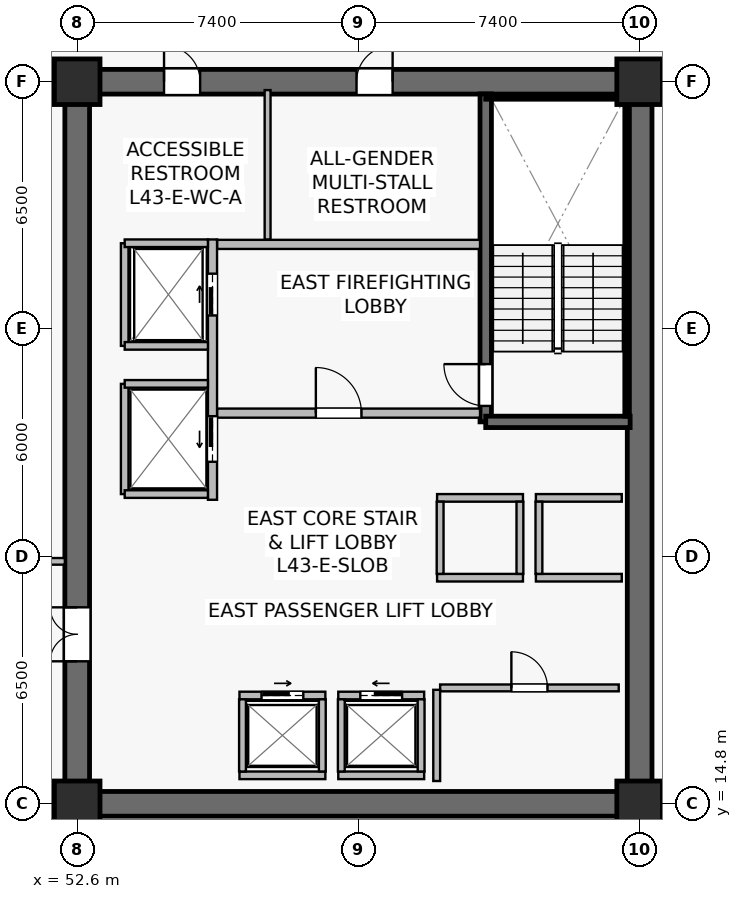
"""IFC4 building model, lengths in metres.
Left out: names, types, materials, properties, quantities, classifications, styles, units other than length and angle.
Written with IfcOpenShell. Run it as: python <this file> out.ifc"""

import sys

from ifc_helpers import new_model, si_unit, direction, frame, frame_2d, origin, origin_2d, place, context, subcontext, project, spatial, rectangle, extrude, source, transform, mapped, element, fill, save


model = new_model("IFC4")
c1 = context("Model", 3, precision=1e-05, world=origin(), true_north=direction((0.0, 1.0)))
c2 = subcontext(c1, "Body", "Model", "MODEL_VIEW")
j1 = project(units=[si_unit("LENGTHUNIT", "METRE"), si_unit("PLANEANGLEUNIT", "RADIAN")], contexts=[c1])
p1 = place(None, origin())
s1 = spatial("IfcSite", under=j1, at=p1, CompositionType="ELEMENT")
p2 = place(p1, origin())
s2 = spatial("IfcBuilding", under=s1, at=p2, CompositionType="ELEMENT")
p3 = place(p2, frame((0.0, 0.0, 178.9)))
s3 = spatial("IfcBuildingStorey", under=s2, at=p3, CompositionType="ELEMENT", Elevation=178.9)
p4 = place(p3, frame((52.275, 14.8, 0.0), z_axis=(0.0, 0.0, 1.0), x_axis=(1.0, 0.0, 0.0)))
e1 = element("IfcWall", 1, at=p4, inside=s3, PredefinedType="SHEAR", context=c2, shape_type="SweptSolid", body=[
    extrude(rectangle(XDim=15.45, YDim=0.65, at=frame_2d((7.725, 0.0))), origin(), (0.0, 0.0, 1.0), 3.79),
])
p5 = place(p3, frame((52.275, 33.8, 0.0), z_axis=(0.0, 0.0, 1.0), x_axis=(1.0, 0.0, 0.0)))
e2 = element("IfcWall", 2, at=p5, inside=s3, PredefinedType="SHEAR", context=c2, shape_type="SweptSolid", body=[
    extrude(rectangle(XDim=15.45, YDim=0.65, at=frame_2d((7.725, 0.0))), origin(), (0.0, 0.0, 1.0), 3.79),
])
p6 = place(p5, frame((7.675, 0.0, 0.0)))
e3 = element("IfcOpeningElement", 3, at=p6, cuts=e2, PredefinedType="OPENING", context=c2, shape_type="SweptSolid", body=[
    extrude(rectangle(XDim=0.95, YDim=2.15, at=frame_2d((0.475, 1.075))), frame((0.0, 0.335, 0.0), z_axis=(0.0, -1.0, 0.0), x_axis=(1.0, 0.0, 0.0)), (0.0, 0.0, 1.0), 0.67),
])
p7 = place(p5, frame((2.61, 0.0, 0.0)))
e4 = element("IfcOpeningElement", 4, at=p7, cuts=e2, PredefinedType="OPENING", context=c2, shape_type="SweptSolid", body=[
    extrude(rectangle(XDim=0.95, YDim=2.15, at=frame_2d((0.475, 1.075))), frame((0.0, 0.335, 0.0), z_axis=(0.0, -1.0, 0.0), x_axis=(1.0, 0.0, 0.0)), (0.0, 0.0, 1.0), 0.67),
])
p8 = place(p3, frame((52.6, 15.125, 0.0), z_axis=(0.0, 0.0, 1.0), x_axis=(0.0, 1.0, 0.0)))
e5 = element("IfcWall", 5, at=p8, inside=s3, PredefinedType="SHEAR", context=c2, shape_type="SweptSolid", body=[
    extrude(rectangle(XDim=18.35, YDim=0.65, at=frame_2d((9.175, 0.0))), origin(), (0.0, 0.0, 1.0), 3.79),
])
p9 = place(p8, frame((3.425, 0.0, 0.0)))
e6 = element("IfcOpeningElement", 6, at=p9, cuts=e5, PredefinedType="OPENING", context=c2, shape_type="SweptSolid", body=[
    extrude(rectangle(XDim=1.42, YDim=2.2, at=frame_2d((0.71, 1.1))), frame((0.0, 0.335, 0.0), z_axis=(0.0, -1.0, 0.0), x_axis=(1.0, 0.0, 0.0)), (0.0, 0.0, 1.0), 0.67),
])
p10 = place(p3, frame((67.4, 15.125, 0.0), z_axis=(0.0, 0.0, 1.0), x_axis=(0.0, 1.0, 0.0)))
e7 = element("IfcWall", 7, at=p10, inside=s3, PredefinedType="SHEAR", context=c2, shape_type="SweptSolid", body=[
    extrude(rectangle(XDim=18.35, YDim=0.65, at=frame_2d((9.175, 0.0))), origin(), (0.0, 0.0, 1.0), 3.79),
])
p11 = place(p3, frame((63.35, 24.85, 0.0), z_axis=(0.0, 0.0, 1.0), x_axis=(0.0, 1.0, 0.0)))
e8 = element("IfcWall", 8, at=p11, inside=s3, PredefinedType="SHEAR", context=c2, shape_type="SweptSolid", body=[
    extrude(rectangle(XDim=8.63, YDim=0.3, at=frame_2d((4.315, 0.0))), origin(), (0.0, 0.0, 1.0), 3.79),
])
p12 = place(p11, frame((0.42, 0.0, 0.0)))
e9 = element("IfcOpeningElement", 9, at=p12, cuts=e8, PredefinedType="OPENING", context=c2, shape_type="SweptSolid", body=[
    extrude(rectangle(XDim=1.1, YDim=2.15, at=frame_2d((0.55, 1.075))), frame((0.0, 0.16, 0.0), z_axis=(0.0, -1.0, 0.0), x_axis=(1.0, 0.0, 0.0)), (0.0, 0.0, 1.0), 0.32),
])
p13 = place(p3, frame((63.35, 24.85, 0.0), z_axis=(0.0, 0.0, 1.0), x_axis=(1.0, 0.0, 0.0)))
e10 = element("IfcWall", 10, at=p13, inside=s3, PredefinedType="SHEAR", context=c2, shape_type="SweptSolid", body=[
    extrude(rectangle(XDim=3.8, YDim=0.3, at=frame_2d((1.9, 0.0))), origin(), (0.0, 0.0, 1.0), 3.79),
])
p14 = place(p3, frame((63.35, 33.4, 0.0), z_axis=(0.0, 0.0, 1.0), x_axis=(1.0, 0.0, 0.0)))
e11 = element("IfcWall", 11, at=p14, inside=s3, PredefinedType="SOLIDWALL", context=c2, shape_type="SweptSolid", body=[
    extrude(rectangle(XDim=3.72, YDim=0.12, at=frame_2d((1.86, 0.0))), origin(), (0.0, 0.0, 1.0), 3.79),
])
p15 = place(p3, frame((67.07, 25.0, 0.0), z_axis=(0.0, 0.0, 1.0), x_axis=(0.0, 1.0, 0.0)))
e12 = element("IfcWall", 12, at=p15, inside=s3, PredefinedType="SOLIDWALL", context=c2, shape_type="SweptSolid", body=[
    extrude(rectangle(XDim=8.32, YDim=0.12, at=frame_2d((4.16, 0.0))), origin(), (0.0, 0.0, 1.0), 3.79),
])
m1 = source(origin(), c2, "Body", "SweptSolid", [
    extrude(rectangle(XDim=1.2, YDim=1.2, at=origin_2d()), origin(), (0.0, 0.0, 1.0), 4.1),
])
for number, where, z_axis, x_axis in (
    (13, (52.6, 14.8, 0.0), (0.0, 0.0, 1.0), (1.0, 0.0, 0.0)),
    (14, (67.4, 14.8, 0.0), (0.0, 0.0, 1.0), (1.0, 0.0, 0.0)),
    (15, (52.6, 33.8, 0.0), (0.0, 0.0, 1.0), (1.0, 0.0, 0.0)),
    (16, (67.4, 33.8, 0.0), (0.0, 0.0, 1.0), (1.0, 0.0, 0.0)),
):
    element("IfcColumn", number, at=place(p3, frame(where, z_axis=z_axis, x_axis=x_axis)), inside=s3, PredefinedType="COLUMN", context=c2, shape_type="MappedRepresentation", body=[
        mapped(m1, transform((0.0, 0.0, 0.0), scale=1.0)),
    ])
p16 = place(p3, frame((56.28, 25.08, 0.0), z_axis=(0.0, 0.0, 1.0), x_axis=(1.0, 0.0, 0.0)))
e17 = element("IfcWall", 17, at=p16, inside=s3, PredefinedType="SOLIDWALL", context=c2, shape_type="SweptSolid", body=[
    extrude(rectangle(XDim=6.92, YDim=0.24, at=frame_2d((3.46, 0.0))), origin(), (0.0, 0.0, 1.0), 3.187),
])
p17 = place(p16, frame((2.6, 0.0, 0.0)))
e18 = element("IfcOpeningElement", 18, at=p17, cuts=e17, PredefinedType="OPENING", context=c2, shape_type="SweptSolid", body=[
    extrude(rectangle(XDim=1.2, YDim=2.16, at=frame_2d((0.6, 1.08))), frame((0.0, 0.13, 0.0), z_axis=(0.0, -1.0, 0.0), x_axis=(1.0, 0.0, 0.0)), (0.0, 0.0, 1.0), 0.26),
])
p18 = place(p3, frame((56.28, 29.52, 0.0), z_axis=(0.0, 0.0, 1.0), x_axis=(1.0, 0.0, 0.0)))
e19 = element("IfcWall", 19, at=p18, inside=s3, PredefinedType="SOLIDWALL", context=c2, shape_type="SweptSolid", body=[
    extrude(rectangle(XDim=6.92, YDim=0.24, at=frame_2d((3.46, 0.0))), origin(), (0.0, 0.0, 1.0), 3.187),
])
p19 = place(p3, frame((56.16, 22.8, 0.0), z_axis=(0.0, 0.0, 1.0), x_axis=(0.0, 1.0, 0.0)))
e20 = element("IfcWall", 20, at=p19, inside=s3, PredefinedType="SOLIDWALL", context=c2, shape_type="SweptSolid", body=[
    extrude(rectangle(XDim=6.85, YDim=0.24, at=frame_2d((3.425, 0.0))), origin(), (0.0, 0.0, 1.0), 2.925),
])
p20 = place(p19, frame((4.85, 0.0, 0.0)))
e21 = element("IfcOpeningElement", 21, at=p20, cuts=e20, PredefinedType="OPENING", context=c2, shape_type="SweptSolid", body=[
    extrude(rectangle(XDim=1.1, YDim=2.22, at=frame_2d((0.55, 1.11))), frame((0.0, 0.13, 0.0), z_axis=(0.0, -1.0, 0.0), x_axis=(1.0, 0.0, 0.0)), (0.0, 0.0, 1.0), 0.26),
])
p21 = place(p19, frame((1.0, 0.0, 0.0)))
e22 = element("IfcOpeningElement", 22, at=p21, cuts=e20, PredefinedType="OPENING", context=c2, shape_type="SweptSolid", body=[
    extrude(rectangle(XDim=1.2, YDim=2.22, at=frame_2d((0.6, 1.11))), frame((0.0, 0.13, 0.0), z_axis=(0.0, -1.0, 0.0), x_axis=(1.0, 0.0, 0.0)), (0.0, 0.0, 1.0), 0.26),
])
p22 = place(p3, frame((59.47, 17.65, 0.0), z_axis=(0.0, 0.0, 1.0), x_axis=(1.0, 0.0, 0.0)))
e23 = element("IfcWall", 23, at=p22, inside=s3, PredefinedType="SOLIDWALL", context=c2, shape_type="SweptSolid", body=[
    extrude(rectangle(XDim=2.26, YDim=0.2, at=frame_2d((1.13, 0.0))), origin(), (0.0, 0.0, 1.0), 3.187),
])
p23 = place(p22, frame((0.58, 0.0, 0.0)))
e24 = element("IfcOpeningElement", 24, at=p23, cuts=e23, PredefinedType="OPENING", context=c2, shape_type="SweptSolid", body=[
    extrude(rectangle(XDim=1.1, YDim=2.22, at=frame_2d((0.55, 1.11))), frame((0.0, 0.11, 0.0), z_axis=(0.0, -1.0, 0.0), x_axis=(1.0, 0.0, 0.0)), (0.0, 0.0, 1.0), 0.22),
])
p24 = place(p3, frame((59.47, 15.55, 0.0), z_axis=(0.0, 0.0, 1.0), x_axis=(1.0, 0.0, 0.0)))
e25 = element("IfcWall", 25, at=p24, inside=s3, PredefinedType="SOLIDWALL", context=c2, shape_type="SweptSolid", body=[
    extrude(rectangle(XDim=2.26, YDim=0.2, at=frame_2d((1.13, 0.0))), origin(), (0.0, 0.0, 1.0), 3.187),
])
for number, where, z_axis, x_axis in (
    (26, (59.55, 15.65, 0.0), (0.0, 0.0, 1.0), (0.0, 1.0, 0.0)),
    (27, (61.65, 15.65, 0.0), (0.0, 0.0, 1.0), (0.0, 1.0, 0.0)),
):
    element("IfcWall", number, at=place(p3, frame(where, z_axis=z_axis, x_axis=x_axis)), inside=s3, PredefinedType="SOLIDWALL", context=c2, shape_type="SweptSolid", body=[
        extrude(rectangle(XDim=1.9, YDim=0.18, at=frame_2d((0.95, 0.0))), origin(), (0.0, 0.0, 1.0), 3.79),
    ])
p25 = place(p3, frame((56.87, 17.65, 0.0), z_axis=(0.0, 0.0, 1.0), x_axis=(1.0, 0.0, 0.0)))
e28 = element("IfcWall", 28, at=p25, inside=s3, PredefinedType="SOLIDWALL", context=c2, shape_type="SweptSolid", body=[
    extrude(rectangle(XDim=2.26, YDim=0.2, at=frame_2d((1.13, 0.0))), origin(), (0.0, 0.0, 1.0), 3.79),
])
p26 = place(p25, frame((0.58, 0.0, 0.0)))
e29 = element("IfcOpeningElement", 29, at=p26, cuts=e28, PredefinedType="OPENING", context=c2, shape_type="SweptSolid", body=[
    extrude(rectangle(XDim=1.1, YDim=2.22, at=frame_2d((0.55, 1.11))), frame((0.0, 0.11, 0.0), z_axis=(0.0, -1.0, 0.0), x_axis=(1.0, 0.0, 0.0)), (0.0, 0.0, 1.0), 0.22),
])
p27 = place(p3, frame((56.87, 15.55, 0.0), z_axis=(0.0, 0.0, 1.0), x_axis=(1.0, 0.0, 0.0)))
e30 = element("IfcWall", 30, at=p27, inside=s3, PredefinedType="SOLIDWALL", context=c2, shape_type="SweptSolid", body=[
    extrude(rectangle(XDim=2.26, YDim=0.2, at=frame_2d((1.13, 0.0))), origin(), (0.0, 0.0, 1.0), 3.79),
])
for number, where, z_axis, x_axis in (
    (31, (56.95, 15.65, 0.0), (0.0, 0.0, 1.0), (0.0, 1.0, 0.0)),
    (32, (59.05, 15.65, 0.0), (0.0, 0.0, 1.0), (0.0, 1.0, 0.0)),
):
    element("IfcWall", number, at=place(p3, frame(where, z_axis=z_axis, x_axis=x_axis)), inside=s3, PredefinedType="SOLIDWALL", context=c2, shape_type="SweptSolid", body=[
        extrude(rectangle(XDim=1.9, YDim=0.18, at=frame_2d((0.95, 0.0))), origin(), (0.0, 0.0, 1.0), 3.79),
    ])
for number, where, z_axis, x_axis in (
    (33, (64.67, 20.75, 0.0), (0.0, 0.0, 1.0), (1.0, 0.0, 0.0)),
    (34, (64.67, 22.85, 0.0), (0.0, 0.0, 1.0), (1.0, 0.0, 0.0)),
):
    element("IfcWall", number, at=place(p3, frame(where, z_axis=z_axis, x_axis=x_axis)), inside=s3, PredefinedType="SOLIDWALL", context=c2, shape_type="SweptSolid", body=[
        extrude(rectangle(XDim=2.26, YDim=0.2, at=frame_2d((1.13, 0.0))), origin(), (0.0, 0.0, 1.0), 3.79),
    ])
p28 = place(p3, frame((64.75, 20.85, 0.0), z_axis=(0.0, 0.0, 1.0), x_axis=(0.0, 1.0, 0.0)))
e35 = element("IfcWall", 35, at=p28, inside=s3, PredefinedType="SOLIDWALL", context=c2, shape_type="SweptSolid", body=[
    extrude(rectangle(XDim=1.9, YDim=0.18, at=frame_2d((0.95, 0.0))), origin(), (0.0, 0.0, 1.0), 3.79),
])
for number, where, z_axis, x_axis in (
    (36, (62.07, 20.75, 0.0), (0.0, 0.0, 1.0), (1.0, 0.0, 0.0)),
    (37, (62.07, 22.85, 0.0), (0.0, 0.0, 1.0), (1.0, 0.0, 0.0)),
):
    element("IfcWall", number, at=place(p3, frame(where, z_axis=z_axis, x_axis=x_axis)), inside=s3, PredefinedType="SOLIDWALL", context=c2, shape_type="SweptSolid", body=[
        extrude(rectangle(XDim=2.26, YDim=0.2, at=frame_2d((1.13, 0.0))), origin(), (0.0, 0.0, 1.0), 3.79),
    ])
for number, where, z_axis, x_axis in (
    (38, (62.15, 20.85, 0.0), (0.0, 0.0, 1.0), (0.0, 1.0, 0.0)),
    (39, (64.25, 20.85, 0.0), (0.0, 0.0, 1.0), (0.0, 1.0, 0.0)),
):
    element("IfcWall", number, at=place(p3, frame(where, z_axis=z_axis, x_axis=x_axis)), inside=s3, PredefinedType="SOLIDWALL", context=c2, shape_type="SweptSolid", body=[
        extrude(rectangle(XDim=1.9, YDim=0.18, at=frame_2d((0.95, 0.0))), origin(), (0.0, 0.0, 1.0), 3.79),
    ])
p29 = place(p3, frame((53.85, 26.85, 0.0), z_axis=(0.0, 0.0, 1.0), x_axis=(0.0, 1.0, 0.0)))
e40 = element("IfcWall", 40, at=p29, inside=s3, PredefinedType="SOLIDWALL", context=c2, shape_type="SweptSolid", body=[
    extrude(rectangle(XDim=2.7, YDim=0.2, at=frame_2d((1.35, 0.0))), origin(), (0.0, 0.0, 1.0), 3.79),
])
p30 = place(p3, frame((53.85, 29.55, 0.0), z_axis=(0.0, 0.0, 1.0), x_axis=(1.0, 0.0, 0.0)))
e41 = element("IfcWall", 41, at=p30, inside=s3, PredefinedType="SOLIDWALL", context=c2, shape_type="SweptSolid", body=[
    extrude(rectangle(XDim=2.19, YDim=0.2, at=frame_2d((1.095, 0.0))), origin(), (0.0, 0.0, 1.0), 3.79),
])
p31 = place(p3, frame((53.85, 26.85, 0.0), z_axis=(0.0, 0.0, 1.0), x_axis=(1.0, 0.0, 0.0)))
e42 = element("IfcWall", 42, at=p31, inside=s3, PredefinedType="SOLIDWALL", context=c2, shape_type="SweptSolid", body=[
    extrude(rectangle(XDim=2.19, YDim=0.2, at=frame_2d((1.095, 0.0))), origin(), (0.0, 0.0, 1.0), 3.187),
])
p32 = place(p3, frame((53.85, 22.95, 0.0), z_axis=(0.0, 0.0, 1.0), x_axis=(0.0, 1.0, 0.0)))
e43 = element("IfcWall", 43, at=p32, inside=s3, PredefinedType="SOLIDWALL", context=c2, shape_type="SweptSolid", body=[
    extrude(rectangle(XDim=2.9, YDim=0.2, at=frame_2d((1.45, 0.0))), origin(), (0.0, 0.0, 1.0), 2.925),
])
for number, where, z_axis, x_axis in (
    (44, (53.85, 25.85, 0.0), (0.0, 0.0, 1.0), (1.0, 0.0, 0.0)),
    (45, (53.85, 22.95, 0.0), (0.0, 0.0, 1.0), (1.0, 0.0, 0.0)),
):
    element("IfcWall", number, at=place(p3, frame(where, z_axis=z_axis, x_axis=x_axis)), inside=s3, PredefinedType="SOLIDWALL", context=c2, shape_type="SweptSolid", body=[
        extrude(rectangle(XDim=2.19, YDim=0.2, at=frame_2d((1.095, 0.0))), origin(), (0.0, 0.0, 1.0), 3.79),
    ])
p33 = place(p3, frame((62.15, 17.85, 0.0), z_axis=(0.0, 0.0, 1.0), x_axis=(1.0, 0.0, 0.0)))
e46 = element("IfcWall", 46, at=p33, inside=s3, PredefinedType="SOLIDWALL", context=c2, shape_type="SweptSolid", body=[
    extrude(rectangle(XDim=4.7, YDim=0.18, at=frame_2d((2.35, 0.0))), origin(), (0.0, 0.0, 1.0), 3.79),
])
p34 = place(p33, frame((1.875, 0.0, 0.0)))
e47 = element("IfcOpeningElement", 47, at=p34, cuts=e46, PredefinedType="OPENING", context=c2, shape_type="SweptSolid", body=[
    extrude(rectangle(XDim=0.95, YDim=2.15, at=frame_2d((0.475, 1.075))), frame((0.0, 0.1, 0.0), z_axis=(0.0, -1.0, 0.0), x_axis=(1.0, 0.0, 0.0)), (0.0, 0.0, 1.0), 0.2),
])
p35 = place(p3, frame((62.06, 15.4, 0.0), z_axis=(0.0, 0.0, 1.0), x_axis=(0.0, 1.0, 0.0)))
e48 = element("IfcWall", 48, at=p35, inside=s3, PredefinedType="SOLIDWALL", context=c2, shape_type="SweptSolid", body=[
    extrude(rectangle(XDim=2.4, YDim=0.18, at=frame_2d((1.2, 0.0))), origin(), (0.0, 0.0, 1.0), 3.79),
])
p36 = place(p3, frame((57.61, 29.65, 0.0), z_axis=(0.0, 0.0, 1.0), x_axis=(0.0, 1.0, 0.0)))
e49 = element("IfcWall", 49, at=p36, inside=s3, PredefinedType="PLUMBINGWALL", context=c2, shape_type="SweptSolid", body=[
    extrude(rectangle(XDim=3.93, YDim=0.155, at=frame_2d((1.965, 0.0))), origin(), (0.0, 0.0, 1.0), 3.79),
])
p37 = place(p3, frame((48.3, 34.26, 0.0), z_axis=(0.0, 0.0, 1.0), x_axis=(1.0, 0.0, 0.0)))
e50 = element("IfcWall", 50, at=p37, inside=s3, PredefinedType="PARTITIONING", context=c2, shape_type="SweptSolid", body=[
    extrude(rectangle(XDim=3.975, YDim=0.175, at=frame_2d((1.987, 0.0))), origin(), (0.0, 0.0, 1.0), 3.475),
])
p38 = place(p3, frame((48.3, 21.18, 0.0), z_axis=(0.0, 0.0, 1.0), x_axis=(1.0, 0.0, 0.0)))
e51 = element("IfcWall", 51, at=p38, inside=s3, PredefinedType="PARTITIONING", context=c2, shape_type="SweptSolid", body=[
    extrude(rectangle(XDim=3.975, YDim=0.175, at=frame_2d((1.987, 0.0))), origin(), (0.0, 0.0, 1.0), 3.79),
])
p39 = place(p38, frame((1.35, 0.0, 0.0)))
e52 = element("IfcOpeningElement", 52, at=p39, cuts=e51, PredefinedType="OPENING", context=c2, shape_type="SweptSolid", body=[
    extrude(rectangle(XDim=0.95, YDim=2.15, at=frame_2d((0.475, 1.075))), frame((0.0, 0.098, 0.0), z_axis=(0.0, -1.0, 0.0), x_axis=(1.0, 0.0, 0.0)), (0.0, 0.0, 1.0), 0.195),
])
m2 = source(origin(), c2, "Body", "SweptSolid", [
    extrude(rectangle(XDim=1.1, YDim=2.15, at=frame_2d((0.55, 1.075))), frame((0.0, 0.025, 0.0), z_axis=(0.0, -1.0, 0.0), x_axis=(1.0, 0.0, 0.0)), (0.0, 0.0, 1.0), 0.05),
])
p40 = place(p12, origin())
e53 = element("IfcDoor", 53, at=p40, inside=s3, OperationType="SINGLE_SWING_RIGHT", PredefinedType="DOOR", context=c2, shape_type="MappedRepresentation", body=[
    mapped(m2, transform((0.0, 0.0, 0.0), scale=1.0)),
])
fill(e9, e53)
m3 = source(origin(), c2, "Body", "SweptSolid", [
    extrude(rectangle(XDim=1.2, YDim=2.16, at=frame_2d((0.6, 1.08))), frame((0.0, 0.025, 0.0), z_axis=(0.0, -1.0, 0.0), x_axis=(1.0, 0.0, 0.0)), (0.0, 0.0, 1.0), 0.05),
])
p41 = place(p17, origin())
e54 = element("IfcDoor", 54, at=p41, inside=s3, OperationType="SINGLE_SWING_LEFT", PredefinedType="DOOR", context=c2, shape_type="MappedRepresentation", body=[
    mapped(m3, transform((0.0, 0.0, 0.0), scale=1.0)),
])
fill(e18, e54)
m4 = source(origin(), c2, "Body", "SweptSolid", [
    extrude(rectangle(XDim=1.1, YDim=2.22, at=frame_2d((0.55, 1.11))), frame((0.0, 0.025, 0.0), z_axis=(0.0, -1.0, 0.0), x_axis=(1.0, 0.0, 0.0)), (0.0, 0.0, 1.0), 0.05),
])
p42 = place(p23, origin())
e55 = element("IfcDoor", 55, at=p42, inside=s3, OperationType="SLIDING_TO_LEFT", PredefinedType="USERDEFINED", context=c2, shape_type="MappedRepresentation", body=[
    mapped(m4, transform((0.0, 0.0, 0.0), scale=1.0)),
])
fill(e24, e55)
p43 = place(p26, origin())
e56 = element("IfcDoor", 56, at=p43, inside=s3, OperationType="SLIDING_TO_RIGHT", PredefinedType="USERDEFINED", context=c2, shape_type="MappedRepresentation", body=[
    mapped(m4, transform((0.0, 0.0, 0.0), scale=1.0)),
])
fill(e29, e56)
p44 = place(p20, origin())
e57 = element("IfcDoor", 57, at=p44, inside=s3, OperationType="SLIDING_TO_RIGHT", PredefinedType="USERDEFINED", context=c2, shape_type="MappedRepresentation", body=[
    mapped(m4, transform((0.0, 0.0, 0.0), scale=1.0)),
])
fill(e21, e57)
m5 = source(origin(), c2, "Body", "SweptSolid", [
    extrude(rectangle(XDim=1.2, YDim=2.22, at=frame_2d((0.6, 1.11))), frame((0.0, 0.025, 0.0), z_axis=(0.0, -1.0, 0.0), x_axis=(1.0, 0.0, 0.0)), (0.0, 0.0, 1.0), 0.05),
])
p45 = place(p21, origin())
e58 = element("IfcDoor", 58, at=p45, inside=s3, OperationType="SLIDING_TO_LEFT", PredefinedType="USERDEFINED", context=c2, shape_type="MappedRepresentation", body=[
    mapped(m5, transform((0.0, 0.0, 0.0), scale=1.0)),
])
fill(e22, e58)
m6 = source(origin(), c2, "Body", "SweptSolid", [
    extrude(rectangle(XDim=0.95, YDim=2.15, at=frame_2d((0.475, 1.075))), frame((0.0, 0.025, 0.0), z_axis=(0.0, -1.0, 0.0), x_axis=(1.0, 0.0, 0.0)), (0.0, 0.0, 1.0), 0.05),
])
p46 = place(p34, origin())
e59 = element("IfcDoor", 59, at=p46, inside=s3, OperationType="SINGLE_SWING_LEFT", PredefinedType="DOOR", context=c2, shape_type="MappedRepresentation", body=[
    mapped(m6, transform((0.0, 0.0, 0.0), scale=1.0)),
])
fill(e47, e59)
m7 = source(origin(), c2, "Body", "SweptSolid", [
    extrude(rectangle(XDim=1.42, YDim=2.2, at=frame_2d((0.71, 1.1))), frame((0.0, 0.025, 0.0), z_axis=(0.0, -1.0, 0.0), x_axis=(1.0, 0.0, 0.0)), (0.0, 0.0, 1.0), 0.05),
])
p47 = place(p9, origin())
e60 = element("IfcDoor", 60, at=p47, inside=s3, OperationType="DOUBLE_DOOR_SINGLE_SWING", PredefinedType="DOOR", context=c2, shape_type="MappedRepresentation", body=[
    mapped(m7, transform((0.0, 0.0, 0.0), scale=1.0)),
])
fill(e6, e60)
p48 = place(p6, origin())
e61 = element("IfcDoor", 61, at=p48, inside=s3, OperationType="SINGLE_SWING_RIGHT", PredefinedType="DOOR", context=c2, shape_type="MappedRepresentation", body=[
    mapped(m6, transform((0.0, 0.0, 0.0), scale=1.0)),
])
fill(e3, e61)
p49 = place(p7, origin())
e62 = element("IfcDoor", 62, at=p49, inside=s3, OperationType="SINGLE_SWING_LEFT", PredefinedType="DOOR", context=c2, shape_type="MappedRepresentation", body=[
    mapped(m6, transform((0.0, 0.0, 0.0), scale=1.0)),
])
fill(e4, e62)
save(model, sys.argv[1])
